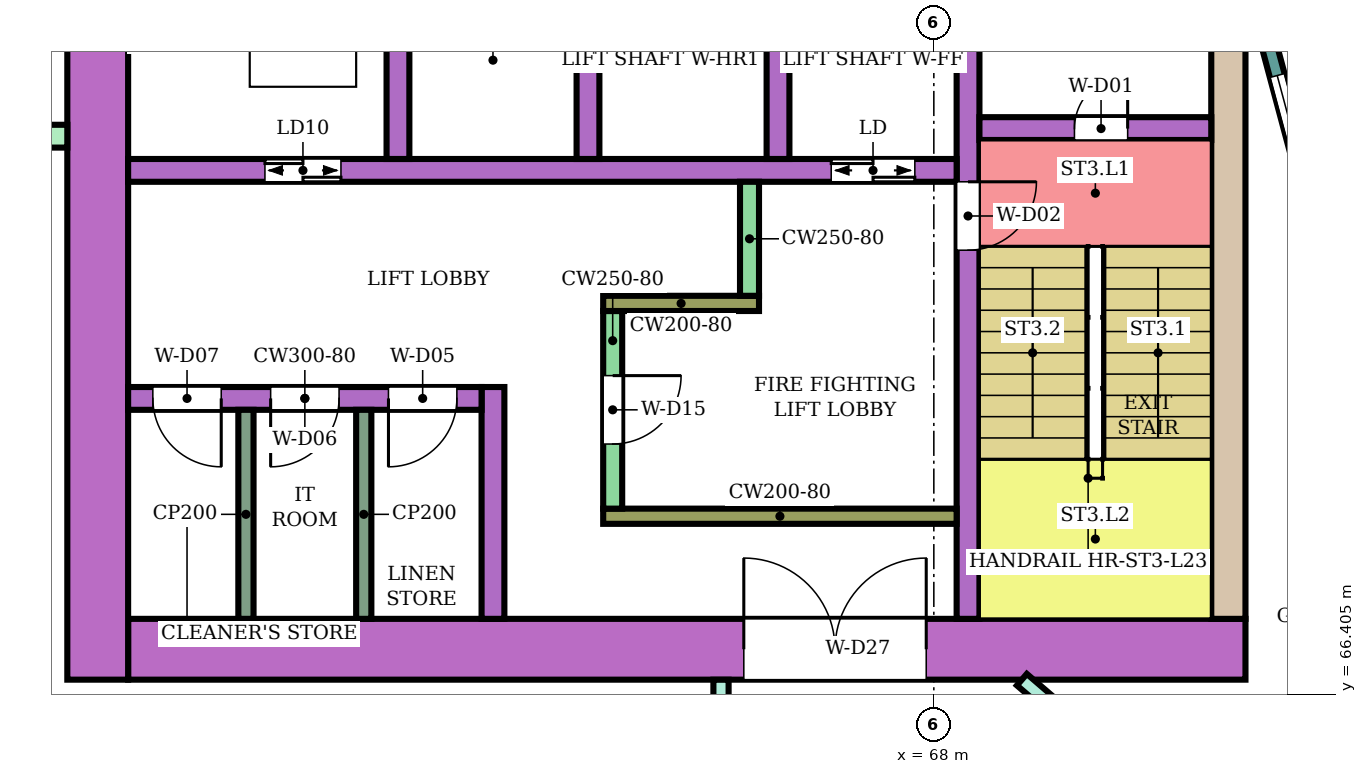
"""IFC4 building model, lengths in metres.
Left out: names, types, materials, properties, quantities, classifications, styles, units other than length and angle.
Written with IfcOpenShell. Run it as: python <this file> out.ifc"""

import sys

from ifc_helpers import new_model, si_unit, direction, frame, frame_2d, origin, place, context, subcontext, project, spatial, rectangle, extrude, element, fill, save


model = new_model("IFC4")
c1 = context("Model", 3, precision=1e-05, world=origin(), true_north=direction((0.0, 1.0)))
c2 = subcontext(c1, "Body", "Model", "MODEL_VIEW")
j1 = project(units=[si_unit("LENGTHUNIT", "METRE"), si_unit("PLANEANGLEUNIT", "RADIAN")], contexts=[c1])
p1 = place(None, origin())
s1 = spatial("IfcSite", under=j1, at=p1, CompositionType="ELEMENT")
p2 = place(p1, origin())
s2 = spatial("IfcBuilding", under=s1, at=p2, CompositionType="ELEMENT")
p3 = place(p2, frame((0.0, 0.0, 101.4)))
s3 = spatial("IfcBuildingStorey", under=s2, at=p3, CompositionType="ELEMENT", Elevation=101.4)
p4 = place(p3, frame((72.1, 67.0, 0.0), z_axis=(0.0, 0.0, 1.0), x_axis=(-1.0, 0.0, 0.0)))
e1 = element("IfcWall", 1, at=p4, inside=s3, PredefinedType="SHEAR", context=c2, shape_type="SweptSolid", body=[
    extrude(rectangle(XDim=14.7, YDim=0.8, at=frame_2d((7.35, 0.0))), origin(), (0.0, 0.0, 1.0), 3.48),
])
p5 = place(p4, frame((4.2, 0.0, 0.0)))
e2 = element("IfcOpeningElement", 2, at=p5, cuts=e1, PredefinedType="OPENING", context=c2, shape_type="SweptSolid", body=[
    extrude(rectangle(XDim=2.4, YDim=2.4, at=frame_2d((1.2, 1.2))), frame((0.0, 0.41, 0.0), z_axis=(0.0, -1.0, 0.0), x_axis=(1.0, 0.0, 0.0)), (0.0, 0.0, 1.0), 0.82),
])
p6 = place(p3, frame((71.875, 75.0, 0.0), z_axis=(0.0, 0.0, 1.0), x_axis=(0.0, -1.0, 0.0)))
e3 = element("IfcWall", 3, at=p6, inside=s3, PredefinedType="SHEAR", context=c2, shape_type="SweptSolid", body=[
    extrude(rectangle(XDim=7.6, YDim=0.45, at=frame_2d((3.8, 0.0))), origin(), (0.0, 0.0, 1.0), 3.48),
])
p7 = place(p3, frame((57.0, 83.4, 0.0), z_axis=(0.0, 0.0, 1.0), x_axis=(0.0, -1.0, 0.0)))
e4 = element("IfcWall", 4, at=p7, inside=s3, PredefinedType="SHEAR", context=c2, shape_type="SweptSolid", body=[
    extrude(rectangle(XDim=16.8, YDim=0.8, at=frame_2d((8.4, 0.0))), origin(), (0.0, 0.0, 1.0), 3.48),
])
p8 = place(p3, frame((68.45, 75.0, 0.0), z_axis=(0.0, 0.0, 1.0), x_axis=(0.0, -1.0, 0.0)))
e5 = element("IfcWall", 5, at=p8, inside=s3, PredefinedType="SHEAR", context=c2, shape_type="SweptSolid", body=[
    extrude(rectangle(XDim=7.6, YDim=0.3, at=frame_2d((3.8, 0.0))), origin(), (0.0, 0.0, 1.0), 3.48),
])
p9 = place(p8, frame((1.85, 0.0, 0.0)))
e6 = element("IfcOpeningElement", 6, at=p9, cuts=e5, PredefinedType="OPENING", context=c2, shape_type="SweptSolid", body=[
    extrude(rectangle(XDim=0.9, YDim=2.1, at=frame_2d((0.45, 1.05))), frame((0.0, 0.16, 0.0), z_axis=(0.0, -1.0, 0.0), x_axis=(1.0, 0.0, 0.0)), (0.0, 0.0, 1.0), 0.32),
])
p10 = place(p3, frame((71.65, 73.85, 0.0), z_axis=(0.0, 0.0, 1.0), x_axis=(-1.0, 0.0, 0.0)))
e7 = element("IfcWall", 7, at=p10, inside=s3, PredefinedType="SHEAR", context=c2, shape_type="SweptSolid", body=[
    extrude(rectangle(XDim=3.05, YDim=0.3, at=frame_2d((1.525, 0.0))), origin(), (0.0, 0.0, 1.0), 3.48),
])
p11 = place(p10, frame((1.1, 0.0, 0.0)))
e8 = element("IfcOpeningElement", 8, at=p11, cuts=e7, PredefinedType="OPENING", context=c2, shape_type="SweptSolid", body=[
    extrude(rectangle(XDim=0.7, YDim=2.0, at=frame_2d((0.35, 1.0))), frame((0.0, 0.16, 0.0), z_axis=(0.0, -1.0, 0.0), x_axis=(1.0, 0.0, 0.0)), (0.0, 0.0, 1.0), 0.32),
])
p12 = place(p3, frame((68.3, 73.3, 0.0), z_axis=(0.0, 0.0, 1.0), x_axis=(-1.0, 0.0, 0.0)))
e9 = element("IfcWall", 9, at=p12, inside=s3, PredefinedType="SHEAR", context=c2, shape_type="SweptSolid", body=[
    extrude(rectangle(XDim=10.9, YDim=0.3, at=frame_2d((5.45, 0.0))), origin(), (0.0, 0.0, 1.0), 3.48),
])
p13 = place(p12, frame((0.55, 0.0, 0.0)))
e10 = element("IfcOpeningElement", 10, at=p13, cuts=e9, PredefinedType="OPENING", context=c2, shape_type="SweptSolid", body=[
    extrude(rectangle(XDim=1.1, YDim=2.1, at=frame_2d((0.55, 1.05))), frame((0.0, 0.16, 0.0), z_axis=(0.0, -1.0, 0.0), x_axis=(1.0, 0.0, 0.0)), (0.0, 0.0, 1.0), 0.32),
])
p14 = place(p12, frame((8.1, 0.0, 0.0)))
e11 = element("IfcOpeningElement", 11, at=p14, cuts=e9, PredefinedType="OPENING", context=c2, shape_type="SweptSolid", body=[
    extrude(rectangle(XDim=1.0, YDim=2.1, at=frame_2d((0.5, 1.05))), frame((0.0, 0.16, 0.0), z_axis=(0.0, -1.0, 0.0), x_axis=(1.0, 0.0, 0.0)), (0.0, 0.0, 1.0), 0.32),
])
for number, where, z_axis, x_axis in (
    (12, (65.95, 76.0, 0.0), (0.0, 0.0, 1.0), (0.0, -1.0, 0.0)),
    (13, (63.45, 76.0, 0.0), (0.0, 0.0, 1.0), (0.0, -1.0, 0.0)),
    (14, (60.95, 76.0, 0.0), (0.0, 0.0, 1.0), (0.0, -1.0, 0.0)),
):
    element("IfcWall", number, at=place(p3, frame(where, z_axis=z_axis, x_axis=x_axis)), inside=s3, PredefinedType="SHEAR", context=c2, shape_type="SweptSolid", body=[
        extrude(rectangle(XDim=2.55, YDim=0.3, at=frame_2d((1.275, 0.0))), origin(), (0.0, 0.0, 1.0), 3.48),
    ])
p15 = place(p3, frame((68.3, 68.75, 0.0), z_axis=(0.0, 0.0, 1.0), x_axis=(-1.0, 0.0, 0.0)))
e15 = element("IfcWall", 15, at=p15, inside=s3, PredefinedType="SHEAR", context=c2, shape_type="SweptSolid", body=[
    extrude(rectangle(XDim=4.65, YDim=0.2, at=frame_2d((2.325, 0.0))), origin(), (0.0, 0.0, 1.0), 3.48),
])
p16 = place(p3, frame((63.775, 71.45, 0.0), z_axis=(0.0, 0.0, 1.0), x_axis=(0.0, -1.0, 0.0)))
e16 = element("IfcWall", 16, at=p16, inside=s3, PredefinedType="SHEAR", context=c2, shape_type="SweptSolid", body=[
    extrude(rectangle(XDim=2.6, YDim=0.25, at=frame_2d((1.3, 0.0))), origin(), (0.0, 0.0, 1.0), 3.48),
])
p17 = place(p16, frame((0.85, 0.0, 0.0)))
e17 = element("IfcOpeningElement", 17, at=p17, cuts=e16, PredefinedType="OPENING", context=c2, shape_type="SweptSolid", body=[
    extrude(rectangle(XDim=0.9, YDim=2.1, at=frame_2d((0.45, 1.05))), frame((0.0, 0.135, 0.0), z_axis=(0.0, -1.0, 0.0), x_axis=(1.0, 0.0, 0.0)), (0.0, 0.0, 1.0), 0.27),
])
p18 = place(p3, frame((65.7, 71.55, 0.0), z_axis=(0.0, 0.0, 1.0), x_axis=(-1.0, 0.0, 0.0)))
e18 = element("IfcWall", 18, at=p18, inside=s3, PredefinedType="SHEAR", context=c2, shape_type="SweptSolid", body=[
    extrude(rectangle(XDim=2.05, YDim=0.2, at=frame_2d((1.025, 0.0))), origin(), (0.0, 0.0, 1.0), 3.48),
])
p19 = place(p3, frame((65.575, 73.15, 0.0), z_axis=(0.0, 0.0, 1.0), x_axis=(0.0, -1.0, 0.0)))
e19 = element("IfcWall", 19, at=p19, inside=s3, PredefinedType="SHEAR", context=c2, shape_type="SweptSolid", body=[
    extrude(rectangle(XDim=1.5, YDim=0.25, at=frame_2d((0.75, 0.0))), origin(), (0.0, 0.0, 1.0), 3.48),
])
p20 = place(p3, frame((62.2, 70.45, 0.0), z_axis=(0.0, 0.0, 1.0), x_axis=(0.0, -1.0, 0.0)))
e20 = element("IfcWall", 20, at=p20, inside=s3, PredefinedType="SHEAR", context=c2, shape_type="SweptSolid", body=[
    extrude(rectangle(XDim=3.05, YDim=0.3, at=frame_2d((1.525, 0.0))), origin(), (0.0, 0.0, 1.0), 3.48),
])
p21 = place(p3, frame((62.05, 70.3, 0.0), z_axis=(0.0, 0.0, 1.0), x_axis=(-1.0, 0.0, 0.0)))
e21 = element("IfcWall", 21, at=p21, inside=s3, PredefinedType="SHEAR", context=c2, shape_type="SweptSolid", body=[
    extrude(rectangle(XDim=4.65, YDim=0.3, at=frame_2d((2.325, 0.0))), origin(), (0.0, 0.0, 1.0), 3.48),
])
p22 = place(p21, frame((0.325, 0.0, 0.0)))
e22 = element("IfcOpeningElement", 22, at=p22, cuts=e21, PredefinedType="OPENING", context=c2, shape_type="SweptSolid", body=[
    extrude(rectangle(XDim=0.9, YDim=2.1, at=frame_2d((0.45, 1.05))), frame((0.0, 0.16, 0.0), z_axis=(0.0, -1.0, 0.0), x_axis=(1.0, 0.0, 0.0)), (0.0, 0.0, 1.0), 0.32),
])
p23 = place(p21, frame((1.875, 0.0, 0.0)))
e23 = element("IfcOpeningElement", 23, at=p23, cuts=e21, PredefinedType="OPENING", context=c2, shape_type="SweptSolid", body=[
    extrude(rectangle(XDim=0.9, YDim=2.1, at=frame_2d((0.45, 1.05))), frame((0.0, 0.16, 0.0), z_axis=(0.0, -1.0, 0.0), x_axis=(1.0, 0.0, 0.0)), (0.0, 0.0, 1.0), 0.32),
])
p24 = place(p21, frame((3.425, 0.0, 0.0)))
e24 = element("IfcOpeningElement", 24, at=p24, cuts=e21, PredefinedType="OPENING", context=c2, shape_type="SweptSolid", body=[
    extrude(rectangle(XDim=0.9, YDim=2.1, at=frame_2d((0.45, 1.05))), frame((0.0, 0.16, 0.0), z_axis=(0.0, -1.0, 0.0), x_axis=(1.0, 0.0, 0.0)), (0.0, 0.0, 1.0), 0.32),
])
p25 = place(p3, frame((56.6, 73.75, 0.0), z_axis=(0.0, 0.0, 1.0), x_axis=(-1.0, 0.0, 0.0)))
e25 = element("IfcWall", 25, at=p25, inside=s3, PredefinedType="NOTDEFINED", context=c2, shape_type="SweptSolid", body=[
    extrude(rectangle(XDim=2.416, YDim=0.3, at=frame_2d((1.208, 0.0))), origin(), (0.0, 0.0, 1.0), 3.8),
])
p26 = place(p3, frame((72.396, 75.0, 0.0), z_axis=(0.0, 0.0, 1.0), x_axis=(0.258789828301, -0.965933654434, 0.0)))
e26 = element("IfcWall", 26, at=p26, inside=s3, PredefinedType="NOTDEFINED", context=c2, shape_type="SweptSolid", body=[
    extrude(rectangle(XDim=3.936, YDim=0.2, at=frame_2d((1.968, 0.0))), origin(), (0.0, 0.0, 1.0), 3.8),
])
p27 = place(p26, frame((0.468, 0.0, 0.9)))
e27 = element("IfcOpeningElement", 27, at=p27, cuts=e26, PredefinedType="OPENING", context=c2, shape_type="SweptSolid", body=[
    extrude(rectangle(XDim=3.0, YDim=2.3, at=frame_2d((1.5, 1.15))), frame((0.0, 0.11, 0.0), z_axis=(0.0, -1.0, 0.0), x_axis=(1.0, 0.0, 0.0)), (0.0, 0.0, 1.0), 0.22),
])
p28 = place(p3, frame((65.2, 65.2, 0.0), z_axis=(0.0, 0.0, 1.0), x_axis=(0.0, 1.0, 0.0)))
e28 = element("IfcWall", 28, at=p28, inside=s3, PredefinedType="PARTITIONING", context=c2, shape_type="SweptSolid", body=[
    extrude(rectangle(XDim=1.399, YDim=0.2, at=frame_2d((0.7, 0.0))), origin(), (0.0, 0.0, 1.0), 3.35),
])
p29 = place(p3, frame((69.158, 66.6, 0.0), z_axis=(0.0, 0.0, 1.0), x_axis=(0.757976058094, -0.652282373943, 0.0)))
e29 = element("IfcWall", 29, at=p29, inside=s3, PredefinedType="PARTITIONING", context=c2, shape_type="SweptSolid", body=[
    extrude(rectangle(XDim=5.16, YDim=0.2, at=frame_2d((2.58, 0.0))), origin(), (0.0, 0.0, 1.0), 3.35),
])
p30 = place(p29, frame((1.6, 0.0, 0.0)))
e30 = element("IfcOpeningElement", 30, at=p30, cuts=e29, PredefinedType="OPENING", context=c2, shape_type="SweptSolid", body=[
    extrude(rectangle(XDim=1.0, YDim=2.1, at=frame_2d((0.5, 1.05))), frame((0.0, 0.11, 0.0), z_axis=(0.0, -1.0, 0.0), x_axis=(1.0, 0.0, 0.0)), (0.0, 0.0, 1.0), 0.22),
])
p31 = place(p3, frame((71.596, 64.635, 0.0), z_axis=(0.0, 0.0, 1.0), x_axis=(0.652285007511, 0.757973791748, 0.0)))
e31 = element("IfcWall", 31, at=p31, inside=s3, PredefinedType="PARTITIONING", context=c2, shape_type="SweptSolid", body=[
    extrude(rectangle(XDim=2.65, YDim=0.1, at=frame_2d((1.325, 0.0))), origin(), (0.0, 0.0, 1.0), 3.35),
])
p32 = place(p31, frame((0.6, 0.0, 0.0)))
e32 = element("IfcOpeningElement", 32, at=p32, cuts=e31, PredefinedType="OPENING", context=c2, shape_type="SweptSolid", body=[
    extrude(rectangle(XDim=0.8, YDim=2.1, at=frame_2d((0.4, 1.05))), frame((0.0, 0.06, 0.0), z_axis=(0.0, -1.0, 0.0), x_axis=(1.0, 0.0, 0.0)), (0.0, 0.0, 1.0), 0.12),
])
for number, where, z_axis, x_axis in (
    (33, (60.5, 70.15, 0.0), (0.0, 0.0, 1.0), (0.0, -1.0, 0.0)),
    (34, (58.95, 70.15, 0.0), (0.0, 0.0, 1.0), (0.0, -1.0, 0.0)),
):
    element("IfcWall", number, at=place(p3, frame(where, z_axis=z_axis, x_axis=x_axis)), inside=s3, PredefinedType="PARTITIONING", context=c2, shape_type="SweptSolid", body=[
        extrude(rectangle(XDim=2.75, YDim=0.2, at=frame_2d((1.375, 0.0))), origin(), (0.0, 0.0, 1.0), 3.48),
    ])
p33 = place(p27, origin())
e35 = element("IfcWindow", 35, at=p33, inside=s3, PartitioningType="SINGLE_PANEL", PredefinedType="WINDOW", context=c2, shape_type="SweptSolid", body=[
    extrude(rectangle(XDim=3.0, YDim=2.3, at=frame_2d((1.5, 1.15))), frame((0.0, 0.03, 0.0), z_axis=(0.0, -1.0, 0.0), x_axis=(1.0, 0.0, 0.0)), (0.0, 0.0, 1.0), 0.06),
])
fill(e27, e35)
p34 = place(p11, frame((0.7, 0.0, 0.0), z_axis=(0.0, 0.0, 1.0), x_axis=(-1.0, 0.0, 0.0)))
e36 = element("IfcDoor", 36, at=p34, inside=s3, OperationType="SINGLE_SWING_RIGHT", PredefinedType="DOOR", context=c2, shape_type="SweptSolid", body=[
    extrude(rectangle(XDim=0.7, YDim=2.0, at=frame_2d((0.35, 1.0))), frame((0.0, 0.025, 0.0), z_axis=(0.0, -1.0, 0.0), x_axis=(1.0, 0.0, 0.0)), (0.0, 0.0, 1.0), 0.05),
])
fill(e8, e36)
p35 = place(p9, origin())
e37 = element("IfcDoor", 37, at=p35, inside=s3, OperationType="SINGLE_SWING_LEFT", PredefinedType="DOOR", context=c2, shape_type="SweptSolid", body=[
    extrude(rectangle(XDim=0.9, YDim=2.1, at=frame_2d((0.45, 1.05))), frame((0.0, 0.025, 0.0), z_axis=(0.0, -1.0, 0.0), x_axis=(1.0, 0.0, 0.0)), (0.0, 0.0, 1.0), 0.05),
])
fill(e6, e37)
p36 = place(p13, origin())
e38 = element("IfcDoor", 38, at=p36, inside=s3, OperationType="DOUBLE_DOOR_SLIDING", PredefinedType="DOOR", context=c2, shape_type="SweptSolid", body=[
    extrude(rectangle(XDim=1.1, YDim=2.1, at=frame_2d((0.55, 1.05))), frame((0.0, 0.025, 0.0), z_axis=(0.0, -1.0, 0.0), x_axis=(1.0, 0.0, 0.0)), (0.0, 0.0, 1.0), 0.05),
])
fill(e10, e38)
p37 = place(p14, origin())
e39 = element("IfcDoor", 39, at=p37, inside=s3, OperationType="DOUBLE_DOOR_SLIDING", PredefinedType="DOOR", context=c2, shape_type="SweptSolid", body=[
    extrude(rectangle(XDim=1.0, YDim=2.1, at=frame_2d((0.5, 1.05))), frame((0.0, 0.025, 0.0), z_axis=(0.0, -1.0, 0.0), x_axis=(1.0, 0.0, 0.0)), (0.0, 0.0, 1.0), 0.05),
])
fill(e11, e39)
p38 = place(p17, origin())
e40 = element("IfcDoor", 40, at=p38, inside=s3, OperationType="SINGLE_SWING_LEFT", PredefinedType="DOOR", context=c2, shape_type="SweptSolid", body=[
    extrude(rectangle(XDim=0.9, YDim=2.1, at=frame_2d((0.45, 1.05))), frame((0.0, 0.025, 0.0), z_axis=(0.0, -1.0, 0.0), x_axis=(1.0, 0.0, 0.0)), (0.0, 0.0, 1.0), 0.05),
])
fill(e17, e40)
p39 = place(p22, origin())
e41 = element("IfcDoor", 41, at=p39, inside=s3, OperationType="SINGLE_SWING_RIGHT", PredefinedType="DOOR", context=c2, shape_type="SweptSolid", body=[
    extrude(rectangle(XDim=0.9, YDim=2.1, at=frame_2d((0.45, 1.05))), frame((0.0, 0.025, 0.0), z_axis=(0.0, -1.0, 0.0), x_axis=(1.0, 0.0, 0.0)), (0.0, 0.0, 1.0), 0.05),
])
fill(e22, e41)
p40 = place(p23, origin())
e42 = element("IfcDoor", 42, at=p40, inside=s3, OperationType="SINGLE_SWING_RIGHT", PredefinedType="DOOR", context=c2, shape_type="SweptSolid", body=[
    extrude(rectangle(XDim=0.9, YDim=2.1, at=frame_2d((0.45, 1.05))), frame((0.0, 0.025, 0.0), z_axis=(0.0, -1.0, 0.0), x_axis=(1.0, 0.0, 0.0)), (0.0, 0.0, 1.0), 0.05),
])
fill(e23, e42)
p41 = place(p24, origin())
e43 = element("IfcDoor", 43, at=p41, inside=s3, OperationType="SINGLE_SWING_LEFT", PredefinedType="DOOR", context=c2, shape_type="SweptSolid", body=[
    extrude(rectangle(XDim=0.9, YDim=2.1, at=frame_2d((0.45, 1.05))), frame((0.0, 0.025, 0.0), z_axis=(0.0, -1.0, 0.0), x_axis=(1.0, 0.0, 0.0)), (0.0, 0.0, 1.0), 0.05),
])
fill(e24, e43)
p42 = place(p5, frame((2.4, 0.0, 0.0), z_axis=(0.0, 0.0, 1.0), x_axis=(-1.0, 0.0, 0.0)))
e44 = element("IfcDoor", 44, at=p42, inside=s3, OperationType="DOUBLE_DOOR_SINGLE_SWING", PredefinedType="DOOR", context=c2, shape_type="SweptSolid", body=[
    extrude(rectangle(XDim=2.4, YDim=2.4, at=frame_2d((1.2, 1.2))), frame((0.0, 0.025, 0.0), z_axis=(0.0, -1.0, 0.0), x_axis=(1.0, 0.0, 0.0)), (0.0, 0.0, 1.0), 0.05),
])
fill(e2, e44)
save(model, sys.argv[1])
